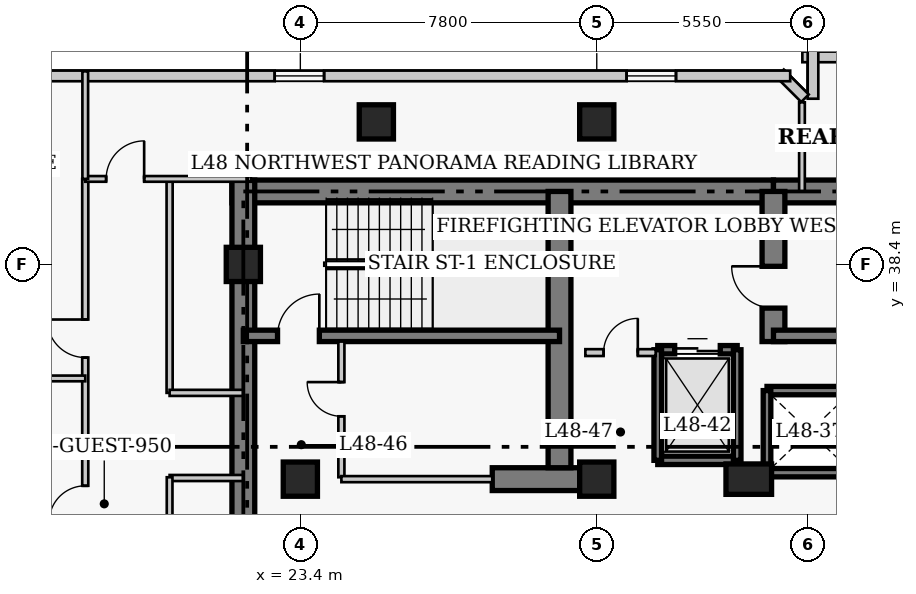
"""IFC4 building model, lengths in metres.
Left out: names, types, materials, properties, quantities, classifications, styles, units other than length and angle.
Written with IfcOpenShell. Run it as: python <this file> out.ifc"""

import sys

from ifc_helpers import new_model, si_unit, direction, frame, frame_2d, origin, origin_2d, place, context, subcontext, project, spatial, rectangle, extrude, element, fill, save


model = new_model("IFC4")
c1 = context("Model", 3, precision=1e-05, world=origin(), true_north=direction((0.0, 1.0)))
c2 = subcontext(c1, "Body", "Model", "MODEL_VIEW")
j1 = project(units=[si_unit("LENGTHUNIT", "METRE"), si_unit("PLANEANGLEUNIT", "RADIAN")], contexts=[c1])
p1 = place(None, origin())
s1 = spatial("IfcSite", under=j1, at=p1, CompositionType="ELEMENT")
p2 = place(p1, origin())
s2 = spatial("IfcBuilding", under=s1, at=p2, CompositionType="ELEMENT")
p3 = place(p2, frame((0.0, 0.0, 192.9)))
s3 = spatial("IfcBuildingStorey", under=s2, at=p3, CompositionType="ELEMENT", Elevation=192.9)
p4 = place(p3, frame((21.6, 40.32, 0.0), z_axis=(0.0, 0.0, 1.0), x_axis=(1.0, 0.0, 0.0)))
e1 = element("IfcWall", 1, at=p4, inside=s3, PredefinedType="SHEAR", context=c2, shape_type="SweptSolid", body=[
    extrude(rectangle(XDim=14.25, YDim=0.6, at=frame_2d((7.125, 0.0))), origin(), (0.0, 0.0, 1.0), 3.9),
])
p5 = place(p3, frame((35.85, 40.32, 0.0), z_axis=(0.0, 0.0, 1.0), x_axis=(1.0, 0.0, 0.0)))
e2 = element("IfcWall", 2, at=p5, inside=s3, PredefinedType="SHEAR", context=c2, shape_type="SweptSolid", body=[
    extrude(rectangle(XDim=12.6, YDim=0.6, at=frame_2d((6.3, 0.0))), origin(), (0.0, 0.0, 1.0), 3.9),
])
p6 = place(p3, frame((21.9, 27.05, 0.0), z_axis=(0.0, 0.0, 1.0), x_axis=(0.0, 1.0, 0.0)))
e3 = element("IfcWall", 3, at=p6, inside=s3, PredefinedType="SHEAR", context=c2, shape_type="SweptSolid", body=[
    extrude(rectangle(XDim=13.57, YDim=0.6, at=frame_2d((6.785, 0.0))), origin(), (0.0, 0.0, 1.0), 3.9),
])
p7 = place(p3, frame((28.45, 32.75, 0.0), z_axis=(0.0, 0.0, 1.0), x_axis=(1.0, 0.0, 0.0)))
e4 = element("IfcWall", 4, at=p7, inside=s3, PredefinedType="SHEAR", context=c2, shape_type="SweptSolid", body=[
    extrude(rectangle(XDim=2.4, YDim=0.6, at=frame_2d((1.2, 0.0))), origin(), (0.0, 0.0, 1.0), 3.9),
])
p8 = place(p3, frame((30.22, 33.05, 0.0), z_axis=(0.0, 0.0, 1.0), x_axis=(0.0, 1.0, 0.0)))
e5 = element("IfcWall", 5, at=p8, inside=s3, PredefinedType="SHEAR", context=c2, shape_type="SweptSolid", body=[
    extrude(rectangle(XDim=7.27, YDim=0.6, at=frame_2d((3.635, 0.0))), origin(), (0.0, 0.0, 1.0), 3.9),
])
p9 = place(p3, frame((35.85, 36.37, 0.0), z_axis=(0.0, 0.0, 1.0), x_axis=(0.0, 1.0, 0.0)))
e6 = element("IfcWall", 6, at=p9, inside=s3, PredefinedType="SHEAR", context=c2, shape_type="SweptSolid", body=[
    extrude(rectangle(XDim=3.95, YDim=0.6, at=frame_2d((1.975, 0.0))), origin(), (0.0, 0.0, 1.0), 3.9),
])
p10 = place(p9, frame((0.88, 0.0, 0.0)))
e7 = element("IfcOpeningElement", 7, at=p10, cuts=e6, PredefinedType="OPENING", context=c2, shape_type="SweptSolid", body=[
    extrude(rectangle(XDim=1.1, YDim=2.15, at=frame_2d((0.55, 1.075))), frame((0.0, 0.31, 0.0), z_axis=(0.0, -1.0, 0.0), x_axis=(1.0, 0.0, 0.0)), (0.0, 0.0, 1.0), 0.62),
])
p11 = place(p3, frame((21.9, 36.52, 0.0), z_axis=(0.0, 0.0, 1.0), x_axis=(1.0, 0.0, 0.0)))
e8 = element("IfcWall", 8, at=p11, inside=s3, PredefinedType="SHEAR", context=c2, shape_type="SweptSolid", body=[
    extrude(rectangle(XDim=8.32, YDim=0.3, at=frame_2d((4.16, 0.0))), origin(), (0.0, 0.0, 1.0), 3.9),
])
p12 = place(p11, frame((0.9, 0.0, 0.0)))
e9 = element("IfcOpeningElement", 9, at=p12, cuts=e8, PredefinedType="OPENING", context=c2, shape_type="SweptSolid", body=[
    extrude(rectangle(XDim=1.1, YDim=2.15, at=frame_2d((0.55, 1.075))), frame((0.0, 0.16, 0.0), z_axis=(0.0, -1.0, 0.0), x_axis=(1.0, 0.0, 0.0)), (0.0, 0.0, 1.0), 0.32),
])
p13 = place(p3, frame((35.85, 36.52, 0.0), z_axis=(0.0, 0.0, 1.0), x_axis=(1.0, 0.0, 0.0)))
e10 = element("IfcWall", 10, at=p13, inside=s3, PredefinedType="SHEAR", context=c2, shape_type="SweptSolid", body=[
    extrude(rectangle(XDim=8.33, YDim=0.3, at=frame_2d((4.165, 0.0))), origin(), (0.0, 0.0, 1.0), 3.9),
])
for number, where, z_axis, x_axis in (
    (11, (21.9, 38.4, 0.0), (0.0, 0.0, 1.0), (1.0, 0.0, 0.0)),
    (12, (23.4, 32.75, 0.0), (0.0, 0.0, 1.0), (1.0, 0.0, 0.0)),
    (13, (31.2, 32.75, 0.0), (0.0, 0.0, 1.0), (1.0, 0.0, 0.0)),
):
    element("IfcColumn", number, at=place(p3, frame(where, z_axis=z_axis, x_axis=x_axis)), inside=s3, PredefinedType="COLUMN", context=c2, shape_type="SweptSolid", body=[
        extrude(rectangle(XDim=0.9, YDim=0.9, at=origin_2d()), origin(), (0.0, 0.0, 1.0), 3.9),
    ])
p14 = place(p3, frame((35.2, 32.75, 0.0), z_axis=(0.0, 0.0, 1.0), x_axis=(1.0, 0.0, 0.0)))
e14 = element("IfcColumn", 14, at=p14, inside=s3, PredefinedType="COLUMN", context=c2, shape_type="SweptSolid", body=[
    extrude(rectangle(XDim=1.2, YDim=0.8, at=origin_2d()), origin(), (0.0, 0.0, 1.0), 3.9),
])
for number, where, z_axis, x_axis in (
    (15, (25.4, 42.15, 0.0), (0.0, 0.0, 1.0), (1.0, 0.0, 0.0)),
    (16, (31.2, 42.15, 0.0), (0.0, 0.0, 1.0), (1.0, 0.0, 0.0)),
):
    element("IfcColumn", number, at=place(p3, frame(where, z_axis=z_axis, x_axis=x_axis)), inside=s3, PredefinedType="COLUMN", context=c2, shape_type="SweptSolid", body=[
        extrude(rectangle(XDim=0.9, YDim=0.9, at=origin_2d()), origin(), (0.0, 0.0, 1.0), 3.9),
    ])
p15 = place(p3, frame((41.39, 43.86, 0.0), z_axis=(0.0, 0.0, 1.0), x_axis=(-1.0, 0.0, 0.0)))
e17 = element("IfcWall", 17, at=p15, inside=s3, PredefinedType="SOLIDWALL", context=c2, shape_type="SweptSolid", body=[
    extrude(rectangle(XDim=4.78, YDim=0.28, at=frame_2d((2.39, 0.0))), origin(), (0.0, 0.0, 1.0), 3.65),
])
p16 = place(p15, frame((1.74, 0.0, 0.85)))
e18 = element("IfcOpeningElement", 18, at=p16, cuts=e17, PredefinedType="OPENING", context=c2, shape_type="SweptSolid", body=[
    extrude(rectangle(XDim=1.3, YDim=1.7, at=frame_2d((0.65, 0.85))), frame((0.0, 0.15, 0.0), z_axis=(0.0, -1.0, 0.0), x_axis=(1.0, 0.0, 0.0)), (0.0, 0.0, 1.0), 0.3),
])
p17 = place(p3, frame((36.89, 44.14, 0.0), z_axis=(0.0, 0.0, 1.0), x_axis=(0.0, -1.0, 0.0)))
e19 = element("IfcWall", 19, at=p17, inside=s3, PredefinedType="SOLIDWALL", context=c2, shape_type="SweptSolid", body=[
    extrude(rectangle(XDim=1.38, YDim=0.28, at=frame_2d((0.69, 0.0))), origin(), (0.0, 0.0, 1.0), 3.65),
])
p18 = place(p3, frame((36.679, 42.773, 0.0), z_axis=(0.0, 0.0, 1.0), x_axis=(-0.707106781187, 0.707106781187, 0.0)))
e20 = element("IfcWall", 20, at=p18, inside=s3, PredefinedType="SOLIDWALL", context=c2, shape_type="SweptSolid", body=[
    extrude(rectangle(XDim=0.928, YDim=0.28, at=frame_2d((0.464, 0.0))), origin(), (0.0, 0.0, 1.0), 3.65),
])
p19 = place(p3, frame((36.29, 43.36, 0.0), z_axis=(0.0, 0.0, 1.0), x_axis=(-1.0, 0.0, 0.0)))
e21 = element("IfcWall", 21, at=p19, inside=s3, PredefinedType="SOLIDWALL", context=c2, shape_type="SweptSolid", body=[
    extrude(rectangle(XDim=25.83, YDim=0.28, at=frame_2d((12.915, 0.0))), origin(), (0.0, 0.0, 1.0), 3.65),
])
p20 = place(p19, frame((3.005, 0.0, 0.85)))
e22 = element("IfcOpeningElement", 22, at=p20, cuts=e21, PredefinedType="OPENING", context=c2, shape_type="SweptSolid", body=[
    extrude(rectangle(XDim=1.3, YDim=1.7, at=frame_2d((0.65, 0.85))), frame((0.0, 0.15, 0.0), z_axis=(0.0, -1.0, 0.0), x_axis=(1.0, 0.0, 0.0)), (0.0, 0.0, 1.0), 0.3),
])
p21 = place(p19, frame((12.265, 0.0, 0.85)))
e23 = element("IfcOpeningElement", 23, at=p21, cuts=e21, PredefinedType="OPENING", context=c2, shape_type="SweptSolid", body=[
    extrude(rectangle(XDim=1.3, YDim=1.7, at=frame_2d((0.65, 0.85))), frame((0.0, 0.15, 0.0), z_axis=(0.0, -1.0, 0.0), x_axis=(1.0, 0.0, 0.0)), (0.0, 0.0, 1.0), 0.3),
])
p22 = place(p19, frame((20.875, 0.0, 0.85)))
e24 = element("IfcOpeningElement", 24, at=p22, cuts=e21, PredefinedType="OPENING", context=c2, shape_type="SweptSolid", body=[
    extrude(rectangle(XDim=1.3, YDim=1.7, at=frame_2d((0.65, 0.85))), frame((0.0, 0.15, 0.0), z_axis=(0.0, -1.0, 0.0), x_axis=(1.0, 0.0, 0.0)), (0.0, 0.0, 1.0), 0.3),
])
for number, where, z_axis, x_axis in (
    (25, (35.68, 35.08, 0.0), (0.0, 0.0, 1.0), (1.0, 0.0, 0.0)),
    (26, (35.68, 32.92, 0.0), (0.0, 0.0, 1.0), (1.0, 0.0, 0.0)),
):
    element("IfcWall", number, at=place(p3, frame(where, z_axis=z_axis, x_axis=x_axis)), inside=s3, PredefinedType="SHEAR", context=c2, shape_type="SweptSolid", body=[
        extrude(rectangle(XDim=2.32, YDim=0.22, at=frame_2d((1.16, 0.0))), origin(), (0.0, 0.0, 1.0), 3.9),
    ])
p23 = place(p3, frame((35.68, 32.92, 0.0), z_axis=(0.0, 0.0, 1.0), x_axis=(0.0, 1.0, 0.0)))
e27 = element("IfcWall", 27, at=p23, inside=s3, PredefinedType="SHEAR", context=c2, shape_type="SweptSolid", body=[
    extrude(rectangle(XDim=2.16, YDim=0.2, at=frame_2d((1.08, 0.0))), origin(), (0.0, 0.0, 1.0), 3.9),
])
p24 = place(p3, frame((32.805, 36.155, 0.0), z_axis=(0.0, 0.0, 1.0), x_axis=(1.0, 0.0, 0.0)))
e28 = element("IfcWall", 28, at=p24, inside=s3, PredefinedType="SHEAR", context=c2, shape_type="SweptSolid", body=[
    extrude(rectangle(XDim=2.09, YDim=0.22, at=frame_2d((1.045, 0.0))), origin(), (0.0, 0.0, 1.0), 3.9),
])
p25 = place(p24, frame((0.445, 0.0, 0.0)))
e29 = element("IfcOpeningElement", 29, at=p25, cuts=e28, PredefinedType="OPENING", context=c2, shape_type="SweptSolid", body=[
    extrude(rectangle(XDim=1.2, YDim=2.15, at=frame_2d((0.6, 1.075))), frame((0.0, 0.12, 0.0), z_axis=(0.0, -1.0, 0.0), x_axis=(1.0, 0.0, 0.0)), (0.0, 0.0, 1.0), 0.24),
])
p26 = place(p3, frame((32.805, 33.245, 0.0), z_axis=(0.0, 0.0, 1.0), x_axis=(1.0, 0.0, 0.0)))
e30 = element("IfcWall", 30, at=p26, inside=s3, PredefinedType="SHEAR", context=c2, shape_type="SweptSolid", body=[
    extrude(rectangle(XDim=2.09, YDim=0.22, at=frame_2d((1.045, 0.0))), origin(), (0.0, 0.0, 1.0), 3.9),
])
for number, where, z_axis, x_axis in (
    (31, (32.805, 33.245, 0.0), (0.0, 0.0, 1.0), (0.0, 1.0, 0.0)),
    (32, (34.895, 33.245, 0.0), (0.0, 0.0, 1.0), (0.0, 1.0, 0.0)),
):
    element("IfcWall", number, at=place(p3, frame(where, z_axis=z_axis, x_axis=x_axis)), inside=s3, PredefinedType="SHEAR", context=c2, shape_type="SweptSolid", body=[
        extrude(rectangle(XDim=2.91, YDim=0.2, at=frame_2d((1.455, 0.0))), origin(), (0.0, 0.0, 1.0), 3.9),
    ])
p27 = place(p3, frame((30.9, 36.08, 0.0), z_axis=(0.0, 0.0, 1.0), x_axis=(1.0, 0.0, 0.0)))
e33 = element("IfcWall", 33, at=p27, inside=s3, PredefinedType="PARTITIONING", context=c2, shape_type="SweptSolid", body=[
    extrude(rectangle(XDim=1.85, YDim=0.18, at=frame_2d((0.925, 0.0))), origin(), (0.0, 0.0, 1.0), 3.65),
])
p28 = place(p27, frame((0.48, 0.0, 0.0)))
e34 = element("IfcOpeningElement", 34, at=p28, cuts=e33, PredefinedType="OPENING", context=c2, shape_type="SweptSolid", body=[
    extrude(rectangle(XDim=0.9, YDim=2.15, at=frame_2d((0.45, 1.075))), frame((0.0, 0.1, 0.0), z_axis=(0.0, -1.0, 0.0), x_axis=(1.0, 0.0, 0.0)), (0.0, 0.0, 1.0), 0.2),
])
p29 = place(p3, frame((24.48, 32.8, 0.0), z_axis=(0.0, 0.0, 1.0), x_axis=(0.0, 1.0, 0.0)))
e35 = element("IfcWall", 35, at=p29, inside=s3, PredefinedType="PARTITIONING", context=c2, shape_type="SweptSolid", body=[
    extrude(rectangle(XDim=3.57, YDim=0.16, at=frame_2d((1.785, 0.0))), origin(), (0.0, 0.0, 1.0), 3.65),
])
p30 = place(p29, frame((1.604, 0.0, 0.0)))
e36 = element("IfcOpeningElement", 36, at=p30, cuts=e35, PredefinedType="OPENING", context=c2, shape_type="SweptSolid", body=[
    extrude(rectangle(XDim=0.9, YDim=2.1, at=frame_2d((0.45, 1.05))), frame((0.0, 0.09, 0.0), z_axis=(0.0, -1.0, 0.0), x_axis=(1.0, 0.0, 0.0)), (0.0, 0.0, 1.0), 0.18),
])
p31 = place(p3, frame((24.48, 32.75, 0.0), z_axis=(0.0, 0.0, 1.0), x_axis=(1.0, 0.0, 0.0)))
e37 = element("IfcWall", 37, at=p31, inside=s3, PredefinedType="PARTITIONING", context=c2, shape_type="SweptSolid", body=[
    extrude(rectangle(XDim=3.97, YDim=0.16, at=frame_2d((1.985, 0.0))), origin(), (0.0, 0.0, 1.0), 3.65),
])
p32 = place(p3, frame((17.74, 7.55, 0.0), z_axis=(0.0, 0.0, 1.0), x_axis=(0.0, 1.0, 0.0)))
e38 = element("IfcWall", 38, at=p32, inside=s3, PredefinedType="PARTITIONING", context=c2, shape_type="SweptSolid", body=[
    extrude(rectangle(XDim=33.1, YDim=0.16, at=frame_2d((16.55, 0.0))), origin(), (0.0, 0.0, 1.0), 3.65),
])
p33 = place(p32, frame((1.35, 0.0, 0.0)))
e39 = element("IfcOpeningElement", 39, at=p33, cuts=e38, PredefinedType="OPENING", context=c2, shape_type="SweptSolid", body=[
    extrude(rectangle(XDim=0.95, YDim=2.1, at=frame_2d((0.475, 1.05))), frame((0.0, 0.09, 0.0), z_axis=(0.0, -1.0, 0.0), x_axis=(1.0, 0.0, 0.0)), (0.0, 0.0, 1.0), 0.18),
])
p34 = place(p32, frame((7.575, 0.0, 0.0)))
e40 = element("IfcOpeningElement", 40, at=p34, cuts=e38, PredefinedType="OPENING", context=c2, shape_type="SweptSolid", body=[
    extrude(rectangle(XDim=0.95, YDim=2.1, at=frame_2d((0.475, 1.05))), frame((0.0, 0.09, 0.0), z_axis=(0.0, -1.0, 0.0), x_axis=(1.0, 0.0, 0.0)), (0.0, 0.0, 1.0), 0.18),
])
p35 = place(p32, frame((16.375, 0.0, 0.0)))
e41 = element("IfcOpeningElement", 41, at=p35, cuts=e38, PredefinedType="OPENING", context=c2, shape_type="SweptSolid", body=[
    extrude(rectangle(XDim=0.95, YDim=2.1, at=frame_2d((0.475, 1.05))), frame((0.0, 0.09, 0.0), z_axis=(0.0, -1.0, 0.0), x_axis=(1.0, 0.0, 0.0)), (0.0, 0.0, 1.0), 0.18),
])
p36 = place(p32, frame((24.075, 0.0, 0.0)))
e42 = element("IfcOpeningElement", 42, at=p36, cuts=e38, PredefinedType="OPENING", context=c2, shape_type="SweptSolid", body=[
    extrude(rectangle(XDim=0.95, YDim=2.1, at=frame_2d((0.475, 1.05))), frame((0.0, 0.09, 0.0), z_axis=(0.0, -1.0, 0.0), x_axis=(1.0, 0.0, 0.0)), (0.0, 0.0, 1.0), 0.18),
])
p37 = place(p32, frame((28.4, 0.0, 0.0)))
e43 = element("IfcOpeningElement", 43, at=p37, cuts=e38, PredefinedType="OPENING", context=c2, shape_type="SweptSolid", body=[
    extrude(rectangle(XDim=1.0, YDim=2.15, at=frame_2d((0.5, 1.075))), frame((0.0, 0.09, 0.0), z_axis=(0.0, -1.0, 0.0), x_axis=(1.0, 0.0, 0.0)), (0.0, 0.0, 1.0), 0.18),
])
p38 = place(p3, frame((19.96, 35.02, 0.0), z_axis=(0.0, 0.0, 1.0), x_axis=(0.0, 1.0, 0.0)))
e44 = element("IfcWall", 44, at=p38, inside=s3, PredefinedType="PARTITIONING", context=c2, shape_type="SweptSolid", body=[
    extrude(rectangle(XDim=5.63, YDim=0.16, at=frame_2d((2.815, 0.0))), origin(), (0.0, 0.0, 1.0), 3.65),
])
for number, where, z_axis, x_axis in (
    (45, (19.96, 35.02, 0.0), (0.0, 0.0, 1.0), (1.0, 0.0, 0.0)),
    (46, (19.96, 32.78, 0.0), (0.0, 0.0, 1.0), (1.0, 0.0, 0.0)),
):
    element("IfcWall", number, at=place(p3, frame(where, z_axis=z_axis, x_axis=x_axis)), inside=s3, PredefinedType="PARTITIONING", context=c2, shape_type="SweptSolid", body=[
        extrude(rectangle(XDim=1.94, YDim=0.16, at=frame_2d((0.97, 0.0))), origin(), (0.0, 0.0, 1.0), 3.65),
    ])
p39 = place(p3, frame((17.74, 40.65, 0.0), z_axis=(0.0, 0.0, 1.0), x_axis=(1.0, 0.0, 0.0)))
e47 = element("IfcWall", 47, at=p39, inside=s3, PredefinedType="PARTITIONING", context=c2, shape_type="SweptSolid", body=[
    extrude(rectangle(XDim=4.36, YDim=0.15, at=frame_2d((2.18, 0.0))), origin(), (0.0, 0.0, 1.0), 3.65),
])
p40 = place(p39, frame((0.55, 0.0, 0.0)))
e48 = element("IfcOpeningElement", 48, at=p40, cuts=e47, PredefinedType="OPENING", context=c2, shape_type="SweptSolid", body=[
    extrude(rectangle(XDim=1.0, YDim=2.15, at=frame_2d((0.5, 1.075))), frame((0.0, 0.085, 0.0), z_axis=(0.0, -1.0, 0.0), x_axis=(1.0, 0.0, 0.0)), (0.0, 0.0, 1.0), 0.17),
])
p41 = place(p3, frame((19.96, 19.16, 0.0), z_axis=(0.0, 0.0, 1.0), x_axis=(0.0, 1.0, 0.0)))
e49 = element("IfcWall", 49, at=p41, inside=s3, PredefinedType="PARTITIONING", context=c2, shape_type="SweptSolid", body=[
    extrude(rectangle(XDim=13.64, YDim=0.15, at=frame_2d((6.82, 0.0))), origin(), (0.0, 0.0, 1.0), 3.65),
])
p42 = place(p3, frame((17.74, 40.65, 0.0), z_axis=(0.0, 0.0, 1.0), x_axis=(0.0, 1.0, 0.0)))
e50 = element("IfcWall", 50, at=p42, inside=s3, PredefinedType="PARTITIONING", context=c2, shape_type="SweptSolid", body=[
    extrude(rectangle(XDim=2.83, YDim=0.15, at=frame_2d((1.415, 0.0))), origin(), (0.0, 0.0, 1.0), 3.65),
])
p43 = place(p3, frame((36.6, 40.32, 0.0), z_axis=(0.0, 0.0, 1.0), x_axis=(0.0, 1.0, 0.0)))
e51 = element("IfcWall", 51, at=p43, inside=s3, PredefinedType="PARTITIONING", context=c2, shape_type="SweptSolid", body=[
    extrude(rectangle(XDim=2.345, YDim=0.15, at=frame_2d((1.172, 0.0))), origin(), (0.0, 0.0, 1.0), 3.65),
])
p44 = place(p3, frame((14.45, 35.4, 0.0), z_axis=(0.0, 0.0, 1.0), x_axis=(1.0, 0.0, 0.0)))
e52 = element("IfcWall", 52, at=p44, inside=s3, PredefinedType="PARTITIONING", context=c2, shape_type="SweptSolid", body=[
    extrude(rectangle(XDim=3.29, YDim=0.15, at=frame_2d((1.645, 0.0))), origin(), (0.0, 0.0, 1.0), 3.65),
])
p45 = place(p20, origin())
e53 = element("IfcWindow", 53, at=p45, inside=s3, PartitioningType="SINGLE_PANEL", PredefinedType="WINDOW", context=c2, shape_type="SweptSolid", body=[
    extrude(rectangle(XDim=1.3, YDim=1.7, at=frame_2d((0.65, 0.85))), frame((0.0, 0.03, 0.0), z_axis=(0.0, -1.0, 0.0), x_axis=(1.0, 0.0, 0.0)), (0.0, 0.0, 1.0), 0.06),
])
fill(e22, e53)
p46 = place(p21, origin())
e54 = element("IfcWindow", 54, at=p46, inside=s3, PartitioningType="SINGLE_PANEL", PredefinedType="WINDOW", context=c2, shape_type="SweptSolid", body=[
    extrude(rectangle(XDim=1.3, YDim=1.7, at=frame_2d((0.65, 0.85))), frame((0.0, 0.03, 0.0), z_axis=(0.0, -1.0, 0.0), x_axis=(1.0, 0.0, 0.0)), (0.0, 0.0, 1.0), 0.06),
])
fill(e23, e54)
p47 = place(p25, origin())
e55 = element("IfcDoor", 55, at=p47, inside=s3, OperationType="DOUBLE_DOOR_SLIDING", PredefinedType="DOOR", context=c2, shape_type="SweptSolid", body=[
    extrude(rectangle(XDim=1.2, YDim=2.15, at=frame_2d((0.6, 1.075))), frame((0.0, 0.025, 0.0), z_axis=(0.0, -1.0, 0.0), x_axis=(1.0, 0.0, 0.0)), (0.0, 0.0, 1.0), 0.05),
])
fill(e29, e55)
p48 = place(p28, origin())
e56 = element("IfcDoor", 56, at=p48, inside=s3, OperationType="SINGLE_SWING_RIGHT", PredefinedType="DOOR", context=c2, shape_type="SweptSolid", body=[
    extrude(rectangle(XDim=0.9, YDim=2.15, at=frame_2d((0.45, 1.075))), frame((0.0, 0.025, 0.0), z_axis=(0.0, -1.0, 0.0), x_axis=(1.0, 0.0, 0.0)), (0.0, 0.0, 1.0), 0.05),
])
fill(e34, e56)
p49 = place(p30, origin())
e57 = element("IfcDoor", 57, at=p49, inside=s3, OperationType="SINGLE_SWING_RIGHT", PredefinedType="DOOR", context=c2, shape_type="SweptSolid", body=[
    extrude(rectangle(XDim=0.9, YDim=2.1, at=frame_2d((0.45, 1.05))), frame((0.0, 0.025, 0.0), z_axis=(0.0, -1.0, 0.0), x_axis=(1.0, 0.0, 0.0)), (0.0, 0.0, 1.0), 0.05),
])
fill(e36, e57)
p50 = place(p40, origin())
e58 = element("IfcDoor", 58, at=p50, inside=s3, OperationType="SINGLE_SWING_RIGHT", PredefinedType="DOOR", context=c2, shape_type="SweptSolid", body=[
    extrude(rectangle(XDim=1.0, YDim=2.15, at=frame_2d((0.5, 1.075))), frame((0.0, 0.025, 0.0), z_axis=(0.0, -1.0, 0.0), x_axis=(1.0, 0.0, 0.0)), (0.0, 0.0, 1.0), 0.05),
])
fill(e48, e58)
p51 = place(p36, origin())
e59 = element("IfcDoor", 59, at=p51, inside=s3, OperationType="SINGLE_SWING_LEFT", PredefinedType="DOOR", context=c2, shape_type="SweptSolid", body=[
    extrude(rectangle(XDim=0.95, YDim=2.1, at=frame_2d((0.475, 1.05))), frame((0.0, 0.025, 0.0), z_axis=(0.0, -1.0, 0.0), x_axis=(1.0, 0.0, 0.0)), (0.0, 0.0, 1.0), 0.05),
])
fill(e42, e59)
p52 = place(p37, origin())
e60 = element("IfcDoor", 60, at=p52, inside=s3, OperationType="SINGLE_SWING_RIGHT", PredefinedType="DOOR", context=c2, shape_type="SweptSolid", body=[
    extrude(rectangle(XDim=1.0, YDim=2.15, at=frame_2d((0.5, 1.075))), frame((0.0, 0.025, 0.0), z_axis=(0.0, -1.0, 0.0), x_axis=(1.0, 0.0, 0.0)), (0.0, 0.0, 1.0), 0.05),
])
fill(e43, e60)
p53 = place(p12, origin())
e61 = element("IfcDoor", 61, at=p53, inside=s3, OperationType="SINGLE_SWING_RIGHT", PredefinedType="DOOR", context=c2, shape_type="SweptSolid", body=[
    extrude(rectangle(XDim=1.1, YDim=2.15, at=frame_2d((0.55, 1.075))), frame((0.0, 0.025, 0.0), z_axis=(0.0, -1.0, 0.0), x_axis=(1.0, 0.0, 0.0)), (0.0, 0.0, 1.0), 0.05),
])
fill(e9, e61)
p54 = place(p10, origin())
e62 = element("IfcDoor", 62, at=p54, inside=s3, OperationType="SINGLE_SWING_RIGHT", PredefinedType="DOOR", context=c2, shape_type="SweptSolid", body=[
    extrude(rectangle(XDim=1.1, YDim=2.15, at=frame_2d((0.55, 1.075))), frame((0.0, 0.025, 0.0), z_axis=(0.0, -1.0, 0.0), x_axis=(1.0, 0.0, 0.0)), (0.0, 0.0, 1.0), 0.05),
])
fill(e7, e62)
save(model, sys.argv[1])
